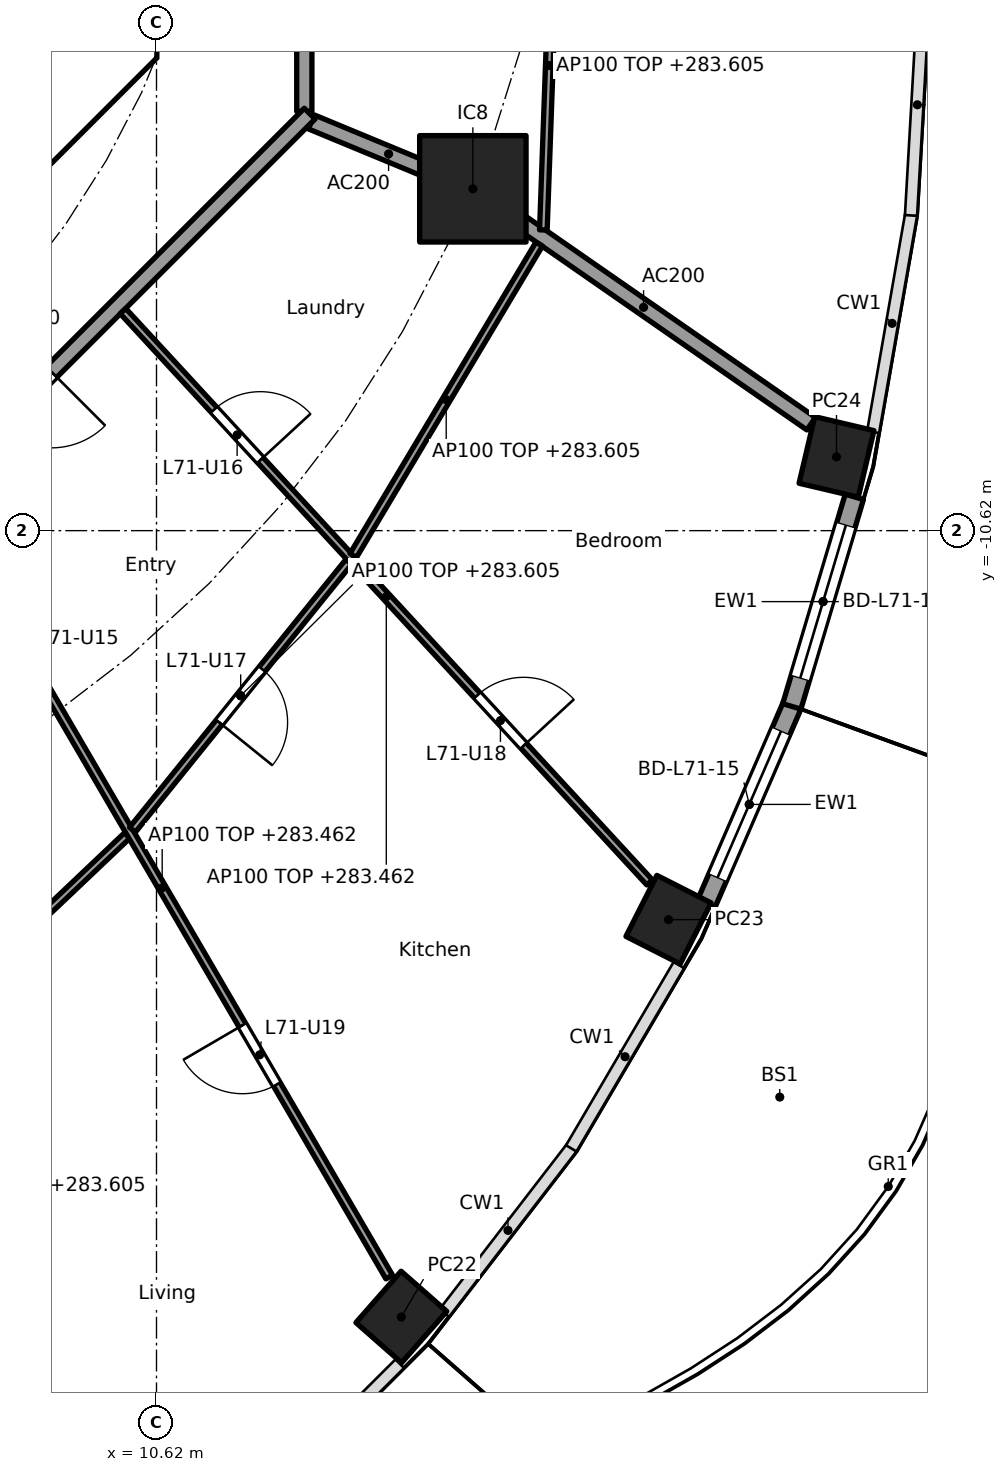
"""IFC4 building model, lengths in metres.
Left out: names, types, materials, properties, quantities, classifications, styles, units other than length and angle.
Written with IfcOpenShell. Run it as: python <this file> out.ifc"""

import sys

from ifc_helpers import new_model, si_unit, direction, frame, frame_2d, origin, origin_2d, place, context, subcontext, project, spatial, polyline, rectangle, hollow_rectangle, outline, extrude, element, fill, save


model = new_model("IFC4")
c1 = context("Model", 3, precision=1e-05, world=origin(), true_north=direction((0.0, 1.0)))
c2 = subcontext(c1, "Body", "Model", "MODEL_VIEW")
j1 = project(units=[si_unit("LENGTHUNIT", "METRE"), si_unit("PLANEANGLEUNIT", "RADIAN")], contexts=[c1])
p1 = place(None, origin())
s1 = spatial("IfcSite", under=j1, at=p1, CompositionType="ELEMENT")
p2 = place(p1, origin())
s2 = spatial("IfcBuilding", under=s1, at=p2, CompositionType="ELEMENT")
p3 = place(p2, frame((0.0, 0.0, 280.7)))
s3 = spatial("IfcBuildingStorey", under=s2, at=p3, CompositionType="ELEMENT", Elevation=280.7)
for number, where, z_axis, x_axis in (
    (1, (13.841, -20.965, 0.0), (0.0, 0.0, 1.0), (0.66, 0.751, 0.0)),
    (2, (17.356, -15.738, 0.0), (0.0, 0.0, 1.0), (0.452, 0.892, 0.0)),
    (3, (19.566, -9.65, 0.0), (0.0, 0.0, 1.0), (0.229, 0.973, 0.0)),
):
    element("IfcColumn", number, at=place(p3, frame(where, z_axis=z_axis, x_axis=x_axis)), inside=s3, PredefinedType="COLUMN", context=c2, shape_type="SweptSolid", body=[
        extrude(hollow_rectangle(XDim=0.9, YDim=0.8, WallThickness=0.028, at=origin_2d()), origin(), (0.0, 0.0, 1.0), 3.7),
    ])
p4 = place(p3, frame((14.782, -6.123, 0.0), z_axis=(0.0, 0.0, 1.0), x_axis=(1.0, 0.0, 0.0)))
e4 = element("IfcColumn", 4, at=p4, inside=s3, PredefinedType="COLUMN", context=c2, shape_type="SweptSolid", body=[
    extrude(rectangle(XDim=1.4, YDim=1.4, at=origin_2d()), origin(), (0.0, 0.0, 1.0), 3.7),
])
p5 = place(p3, frame((18.983, -12.918, 0.0), z_axis=(0.0, 0.0, 1.0), x_axis=(-0.397597791596, -0.9175598052, 0.0)))
e5 = element("IfcWall", 5, at=p5, inside=s3, PredefinedType="SOLIDWALL", context=c2, shape_type="SweptSolid", body=[
    extrude(rectangle(XDim=2.841, YDim=0.25, at=frame_2d((1.42, 0.0))), origin(), (0.0, 0.0, 1.0), 3.44),
])
p6 = place(p5, frame((0.371, 0.0, 0.0)))
e6 = element("IfcOpeningElement", 6, at=p6, cuts=e5, PredefinedType="OPENING", context=c2, shape_type="SweptSolid", body=[
    extrude(rectangle(XDim=2.1, YDim=2.4, at=frame_2d((1.05, 1.2))), frame((0.0, 0.135, 0.0), z_axis=(0.0, -1.0, 0.0), x_axis=(1.0, 0.0, 0.0)), (0.0, 0.0, 1.0), 0.27),
])
p7 = place(p3, frame((19.801, -10.175, 0.0), z_axis=(0.0, 0.0, 1.0), x_axis=(-0.285899456462, -0.958259620768, 0.0)))
e7 = element("IfcWall", 7, at=p7, inside=s3, PredefinedType="SOLIDWALL", context=c2, shape_type="SweptSolid", body=[
    extrude(rectangle(XDim=2.877, YDim=0.25, at=frame_2d((1.438, 0.0))), origin(), (0.0, 0.0, 1.0), 3.44),
])
p8 = place(p7, frame((0.389, 0.0, 0.0)))
e8 = element("IfcOpeningElement", 8, at=p8, cuts=e7, PredefinedType="OPENING", context=c2, shape_type="SweptSolid", body=[
    extrude(rectangle(XDim=2.1, YDim=2.4, at=frame_2d((1.05, 1.2))), frame((0.0, 0.135, 0.0), z_axis=(0.0, -1.0, 0.0), x_axis=(1.0, 0.0, 0.0)), (0.0, 0.0, 1.0), 0.27),
])
p9 = place(p3, frame((4.613, -9.988, 0.0), z_axis=(0.0, 0.0, 1.0), x_axis=(0.707106781187, 0.707106781187, 0.0)))
e9 = element("IfcWall", 9, at=p9, inside=s3, PredefinedType="SHEAR", context=c2, shape_type="SweptSolid", body=[
    extrude(rectangle(XDim=7.602, YDim=0.6, at=frame_2d((3.801, 0.0))), origin(), (0.0, 0.0, 1.0), 3.44),
])
p10 = place(p9, frame((3.201, 0.0, 0.0)))
e10 = element("IfcOpeningElement", 10, at=p10, cuts=e9, PredefinedType="OPENING", context=c2, shape_type="SweptSolid", body=[
    extrude(rectangle(XDim=1.2, YDim=2.1, at=frame_2d((0.6, 1.05))), frame((0.0, 0.31, 0.0), z_axis=(0.0, -1.0, 0.0), x_axis=(1.0, 0.0, 0.0)), (0.0, 0.0, 1.0), 0.62),
])
p11 = place(p3, origin())
e11 = element("IfcWall", 11, at=p11, inside=s3, PredefinedType="SHEAR", context=c2, shape_type="SweptSolid", body=[
    extrude(outline(polyline([(9.776, -4.401), (10.025, -4.152), (10.025, -3.801), (10.025, 4.152), (9.776, 4.401), (10.2, 4.825), (10.625, 4.401), (10.625, -4.401), (10.2, -4.825), (9.776, -4.401)])), origin(), (0.0, 0.0, 1.0), 3.44),
])
p12 = place(p3, frame((6.138, -14.83, 0.0), z_axis=(0.0, 0.0, 1.0), x_axis=(0.303653679037, -0.952782474234, 0.0)))
e12 = element("IfcWall", 12, at=p12, inside=s3, PredefinedType="PARTITIONING", context=c2, shape_type="SweptSolid", body=[
    extrude(rectangle(XDim=10.076, YDim=0.2, at=frame_2d((5.038, 0.0))), origin(), (0.0, 0.0, 1.0), 2.905),
])
p13 = place(p3, frame((12.657, -5.243, 0.0), z_axis=(0.0, 0.0, 1.0), x_axis=(0.92383017907, -0.382802560388, 0.0)))
e13 = element("IfcWall", 13, at=p13, inside=s3, PredefinedType="PARTITIONING", context=c2, shape_type="SweptSolid", body=[
    extrude(rectangle(XDim=2.2, YDim=0.2, at=frame_2d((1.1, 0.0))), origin(), (0.0, 0.0, 1.0), 3.44),
])
p14 = place(p3, frame((14.823, -6.151, 0.0), z_axis=(0.0, 0.0, 1.0), x_axis=(0.821435065081, -0.570302054928, 0.0)))
e14 = element("IfcWall", 14, at=p14, inside=s3, PredefinedType="PARTITIONING", context=c2, shape_type="SweptSolid", body=[
    extrude(rectangle(XDim=5.368, YDim=0.2, at=frame_2d((2.684, 0.0))), origin(), (0.0, 0.0, 1.0), 3.44),
])
p15 = place(p3, frame((12.565, -5.104, 0.0), z_axis=(0.0, 0.0, 1.0), x_axis=(0.0, 1.0, 0.0)))
e15 = element("IfcWall", 15, at=p15, inside=s3, PredefinedType="PARTITIONING", context=c2, shape_type="SweptSolid", body=[
    extrude(rectangle(XDim=10.209, YDim=0.2, at=frame_2d((5.104, 0.0))), origin(), (0.0, 0.0, 1.0), 3.44),
])
p16 = place(p15, frame((4.604, 0.0, 0.0)))
e16 = element("IfcOpeningElement", 16, at=p16, cuts=e15, PredefinedType="OPENING", context=c2, shape_type="SweptSolid", body=[
    extrude(rectangle(XDim=1.0, YDim=2.1, at=frame_2d((0.5, 1.05))), frame((0.0, 0.11, 0.0), z_axis=(0.0, -1.0, 0.0), x_axis=(1.0, 0.0, 0.0)), (0.0, 0.0, 1.0), 0.22),
])
p17 = place(p3, frame((5.275, -12.494, 0.0), z_axis=(0.0, 0.0, 1.0), x_axis=(0.707106781187, 0.707106781187, 0.0)))
e17 = element("IfcWall", 17, at=p17, inside=s3, PredefinedType="PARTITIONING", context=c2, shape_type="SweptSolid", body=[
    extrude(rectangle(XDim=10.409, YDim=0.2, at=frame_2d((5.205, 0.0))), origin(), (0.0, 0.0, 1.0), 3.44),
])
p18 = place(p17, frame((4.604, 0.0, 0.0)))
e18 = element("IfcOpeningElement", 18, at=p18, cuts=e17, PredefinedType="OPENING", context=c2, shape_type="SweptSolid", body=[
    extrude(rectangle(XDim=1.0, YDim=2.1, at=frame_2d((0.5, 1.05))), frame((0.0, 0.11, 0.0), z_axis=(0.0, -1.0, 0.0), x_axis=(1.0, 0.0, 0.0)), (0.0, 0.0, 1.0), 0.22),
])
p19 = place(p3, frame((15.865, -2.338, 0.0), z_axis=(0.0, 0.0, 1.0), x_axis=(-0.035864509465, -0.999356661538, 0.0)))
e19 = element("IfcWall", 19, at=p19, inside=s3, PredefinedType="PARTITIONING", context=c2, shape_type="SweptSolid", body=[
    extrude(rectangle(XDim=4.329, YDim=0.1, at=frame_2d((2.165, 0.0))), origin(), (0.0, 0.0, 1.0), 2.905),
])
p20 = place(p3, frame((7.113, -17.592, 0.0), z_axis=(0.0, 0.0, 1.0), x_axis=(0.725433932329, 0.688291805723, 0.0)))
e20 = element("IfcWall", 20, at=p20, inside=s3, PredefinedType="PARTITIONING", context=c2, shape_type="SweptSolid", body=[
    extrude(rectangle(XDim=4.305, YDim=0.1, at=frame_2d((2.153, 0.0))), origin(), (0.0, 0.0, 1.0), 2.905),
])
p21 = place(p3, frame((7.708, -10.198, 0.0), z_axis=(0.0, 0.0, 1.0), x_axis=(0.503839015963, -0.863797572347, 0.0)))
e21 = element("IfcWall", 21, at=p21, inside=s3, PredefinedType="PARTITIONING", context=c2, shape_type="SweptSolid", body=[
    extrude(rectangle(XDim=11.856, YDim=0.1, at=frame_2d((5.928, 0.0))), origin(), (0.0, 0.0, 1.0), 2.762),
])
p22 = place(p21, frame((2.095, 0.0, 0.0)))
e22 = element("IfcOpeningElement", 22, at=p22, cuts=e21, PredefinedType="OPENING", context=c2, shape_type="SweptSolid", body=[
    extrude(rectangle(XDim=0.9, YDim=2.1, at=frame_2d((0.45, 1.05))), frame((0.0, 0.06, 0.0), z_axis=(0.0, -1.0, 0.0), x_axis=(1.0, 0.0, 0.0)), (0.0, 0.0, 1.0), 0.12),
])
p23 = place(p21, frame((8.023, 0.0, 0.0)))
e23 = element("IfcOpeningElement", 23, at=p23, cuts=e21, PredefinedType="OPENING", context=c2, shape_type="SweptSolid", body=[
    extrude(rectangle(XDim=0.9, YDim=2.1, at=frame_2d((0.45, 1.05))), frame((0.0, 0.06, 0.0), z_axis=(0.0, -1.0, 0.0), x_axis=(1.0, 0.0, 0.0)), (0.0, 0.0, 1.0), 0.12),
])
p24 = place(p3, frame((10.304, -14.555, 0.0), z_axis=(0.0, 0.0, 1.0), x_axis=(0.628170338674, 0.778075848237, 0.0)))
e24 = element("IfcWall", 24, at=p24, inside=s3, PredefinedType="PARTITIONING", context=c2, shape_type="SweptSolid", body=[
    extrude(rectangle(XDim=4.532, YDim=0.1, at=frame_2d((2.266, 0.0))), origin(), (0.0, 0.0, 1.0), 2.905),
])
p25 = place(p24, frame((1.816, 0.0, 0.0)))
e25 = element("IfcOpeningElement", 25, at=p25, cuts=e24, PredefinedType="OPENING", context=c2, shape_type="SweptSolid", body=[
    extrude(rectangle(XDim=0.9, YDim=2.1, at=frame_2d((0.45, 1.05))), frame((0.0, 0.06, 0.0), z_axis=(0.0, -1.0, 0.0), x_axis=(1.0, 0.0, 0.0)), (0.0, 0.0, 1.0), 0.12),
])
p26 = place(p3, frame((10.179, -7.731, 0.0), z_axis=(0.0, 0.0, 1.0), x_axis=(0.67775318564, -0.73528947997, 0.0)))
e26 = element("IfcWall", 26, at=p26, inside=s3, PredefinedType="PARTITIONING", context=c2, shape_type="SweptSolid", body=[
    extrude(rectangle(XDim=10.222, YDim=0.1, at=frame_2d((5.111, 0.0))), origin(), (0.0, 0.0, 1.0), 2.762),
])
p27 = place(p26, frame((1.766, 0.0, 0.0)))
e27 = element("IfcOpeningElement", 27, at=p27, cuts=e26, PredefinedType="OPENING", context=c2, shape_type="SweptSolid", body=[
    extrude(rectangle(XDim=0.9, YDim=2.1, at=frame_2d((0.45, 1.05))), frame((0.0, 0.06, 0.0), z_axis=(0.0, -1.0, 0.0), x_axis=(1.0, 0.0, 0.0)), (0.0, 0.0, 1.0), 0.12),
])
p28 = place(p26, frame((6.877, 0.0, 0.0)))
e28 = element("IfcOpeningElement", 28, at=p28, cuts=e26, PredefinedType="OPENING", context=c2, shape_type="SweptSolid", body=[
    extrude(rectangle(XDim=0.9, YDim=2.1, at=frame_2d((0.45, 1.05))), frame((0.0, 0.06, 0.0), z_axis=(0.0, -1.0, 0.0), x_axis=(1.0, 0.0, 0.0)), (0.0, 0.0, 1.0), 0.12),
])
p29 = place(p3, frame((13.208, -10.947, 0.0), z_axis=(0.0, 0.0, 1.0), x_axis=(0.512726452516, 0.858552028063, 0.0)))
e29 = element("IfcWall", 29, at=p29, inside=s3, PredefinedType="PARTITIONING", context=c2, shape_type="SweptSolid", body=[
    extrude(rectangle(XDim=4.772, YDim=0.1, at=frame_2d((2.386, 0.0))), origin(), (0.0, 0.0, 1.0), 2.905),
])
p30 = place(p6, origin())
e30 = element("IfcDoor", 30, at=p30, inside=s3, OperationType="SLIDING_TO_LEFT", PredefinedType="DOOR", context=c2, shape_type="SweptSolid", body=[
    extrude(rectangle(XDim=2.1, YDim=2.4, at=frame_2d((1.05, 1.2))), frame((0.0, 0.025, 0.0), z_axis=(0.0, -1.0, 0.0), x_axis=(1.0, 0.0, 0.0)), (0.0, 0.0, 1.0), 0.05),
])
fill(e6, e30)
p31 = place(p8, origin())
e31 = element("IfcDoor", 31, at=p31, inside=s3, OperationType="SLIDING_TO_LEFT", PredefinedType="DOOR", context=c2, shape_type="SweptSolid", body=[
    extrude(rectangle(XDim=2.1, YDim=2.4, at=frame_2d((1.05, 1.2))), frame((0.0, 0.025, 0.0), z_axis=(0.0, -1.0, 0.0), x_axis=(1.0, 0.0, 0.0)), (0.0, 0.0, 1.0), 0.05),
])
fill(e8, e31)
p32 = place(p18, frame((1.0, 0.0, 0.0), x_axis=(-1.0, 0.0, 0.0)))
e32 = element("IfcDoor", 32, at=p32, inside=s3, OperationType="SINGLE_SWING_LEFT", PredefinedType="DOOR", context=c2, shape_type="SweptSolid", body=[
    extrude(rectangle(XDim=1.0, YDim=2.1, at=frame_2d((0.5, 1.05))), frame((0.0, 0.025, 0.0), z_axis=(0.0, -1.0, 0.0), x_axis=(1.0, 0.0, 0.0)), (0.0, 0.0, 1.0), 0.05),
])
fill(e18, e32)
p33 = place(p27, origin())
e33 = element("IfcDoor", 33, at=p33, inside=s3, OperationType="SINGLE_SWING_RIGHT", PredefinedType="DOOR", context=c2, shape_type="SweptSolid", body=[
    extrude(rectangle(XDim=0.9, YDim=2.1, at=frame_2d((0.45, 1.05))), frame((0.0, 0.025, 0.0), z_axis=(0.0, -1.0, 0.0), x_axis=(1.0, 0.0, 0.0)), (0.0, 0.0, 1.0), 0.05),
])
fill(e27, e33)
p34 = place(p25, frame((0.9, 0.0, 0.0), x_axis=(-1.0, 0.0, 0.0)))
e34 = element("IfcDoor", 34, at=p34, inside=s3, OperationType="SINGLE_SWING_RIGHT", PredefinedType="DOOR", context=c2, shape_type="SweptSolid", body=[
    extrude(rectangle(XDim=0.9, YDim=2.1, at=frame_2d((0.45, 1.05))), frame((0.0, 0.025, 0.0), z_axis=(0.0, -1.0, 0.0), x_axis=(1.0, 0.0, 0.0)), (0.0, 0.0, 1.0), 0.05),
])
fill(e25, e34)
p35 = place(p28, origin())
e35 = element("IfcDoor", 35, at=p35, inside=s3, OperationType="SINGLE_SWING_RIGHT", PredefinedType="DOOR", context=c2, shape_type="SweptSolid", body=[
    extrude(rectangle(XDim=0.9, YDim=2.1, at=frame_2d((0.45, 1.05))), frame((0.0, 0.025, 0.0), z_axis=(0.0, -1.0, 0.0), x_axis=(1.0, 0.0, 0.0)), (0.0, 0.0, 1.0), 0.05),
])
fill(e28, e35)
p36 = place(p23, frame((0.9, 0.0, 0.0), x_axis=(-1.0, 0.0, 0.0)))
e36 = element("IfcDoor", 36, at=p36, inside=s3, OperationType="SINGLE_SWING_RIGHT", PredefinedType="DOOR", context=c2, shape_type="SweptSolid", body=[
    extrude(rectangle(XDim=0.9, YDim=2.1, at=frame_2d((0.45, 1.05))), frame((0.0, 0.025, 0.0), z_axis=(0.0, -1.0, 0.0), x_axis=(1.0, 0.0, 0.0)), (0.0, 0.0, 1.0), 0.05),
])
fill(e23, e36)
save(model, sys.argv[1])
